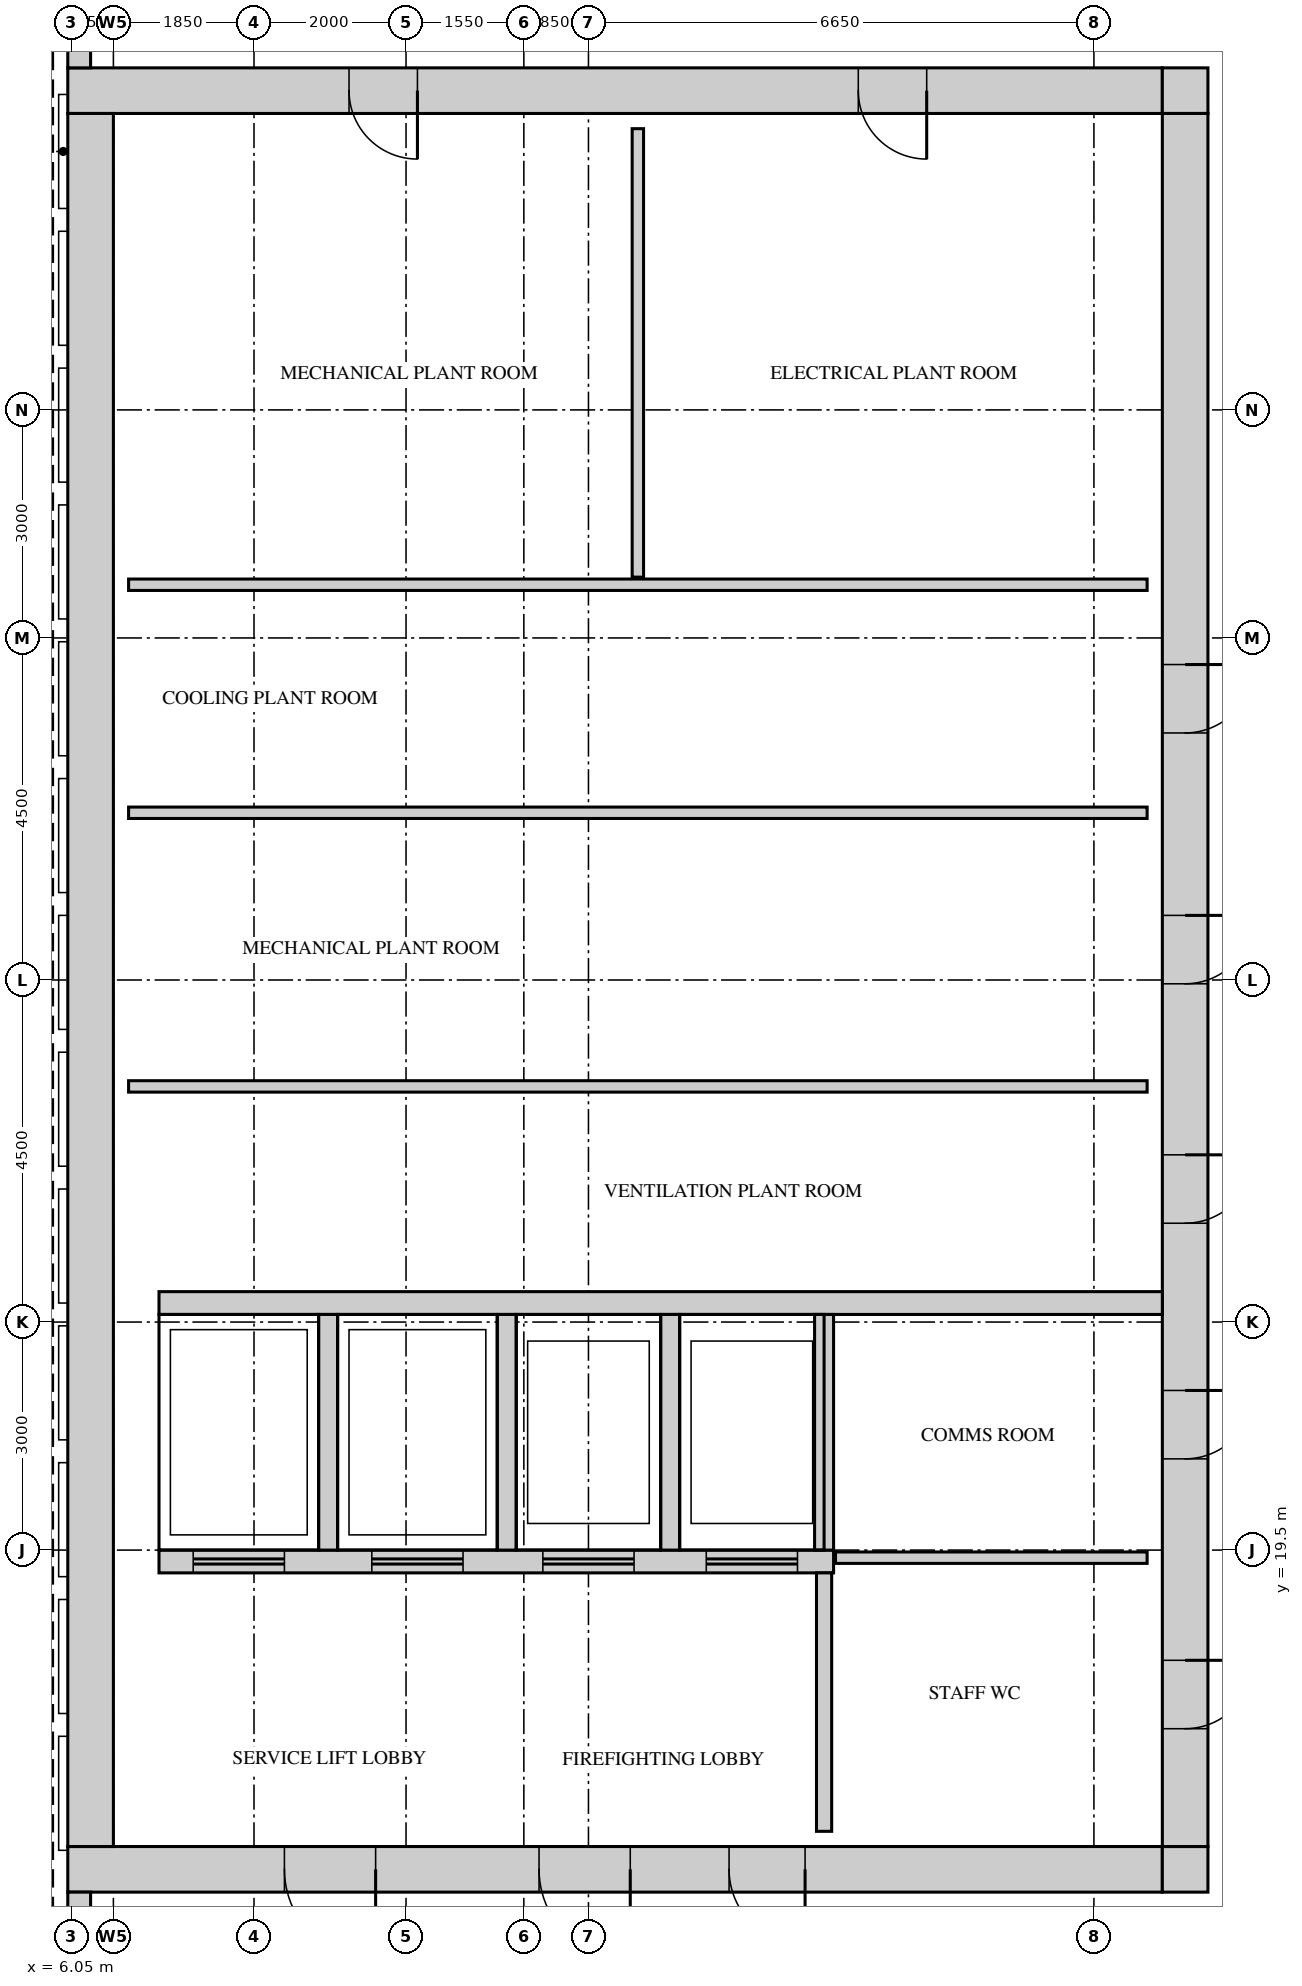
"""IFC4 building model, lengths in metres.
Left out: names, types, materials, properties, quantities, classifications, styles, units other than length and angle.
Written with IfcOpenShell. Run it as: python <this file> out.ifc"""

import sys

from ifc_helpers import new_model, si_unit, direction, frame, frame_2d, origin, place, context, subcontext, project, spatial, rectangle, extrude, source, transform, mapped, element, fill, save


model = new_model("IFC4")
c1 = context("Model", 3, precision=1e-05, world=origin(), true_north=direction((0.0, 1.0)))
c2 = subcontext(c1, "Body", "Model", "MODEL_VIEW")
j1 = project(units=[si_unit("LENGTHUNIT", "METRE"), si_unit("PLANEANGLEUNIT", "RADIAN")], contexts=[c1])
p1 = place(None, origin())
s1 = spatial("IfcSite", under=j1, at=p1, CompositionType="ELEMENT")
p2 = place(p1, origin())
s2 = spatial("IfcBuilding", under=s1, at=p2, CompositionType="ELEMENT")
p3 = place(p2, frame((0.0, 0.0, 343.7)))
s3 = spatial("IfcBuildingStorey", under=s2, at=p3, CompositionType="ELEMENT", Elevation=343.7)
m1 = source(origin(), c2, "Body", "SweptSolid", [
    extrude(rectangle(XDim=14.4, YDim=0.6, at=frame_2d((7.2, 0.0))), origin(), (0.0, 0.0, 1.0), 4.25),
])
p4 = place(p3, frame((6.0, 38.7, 0.0), z_axis=(0.0, 0.0, 1.0), x_axis=(1.0, 0.0, 0.0)))
e1 = element("IfcWall", 1, at=p4, inside=s3, PredefinedType="SHEAR", context=c2, shape_type="MappedRepresentation", body=[
    mapped(m1, transform((0.0, 0.0, 0.0))),
])
m2 = source(origin(), c2, "Body", "SweptSolid", [
    extrude(rectangle(XDim=0.9, YDim=2.1, at=frame_2d((0.45, 1.05))), frame((0.0, 0.31, 0.0), z_axis=(0.0, -1.0, 0.0), x_axis=(1.0, 0.0, 0.0)), (0.0, 0.0, 1.0), 0.62),
])
p5 = place(p4, frame((3.7, 0.0, 0.0)))
e2 = element("IfcOpeningElement", 2, at=p5, cuts=e1, PredefinedType="OPENING", context=c2, shape_type="MappedRepresentation", body=[
    mapped(m2, transform((0.0, 0.0, 0.0))),
])
p6 = place(p4, frame((10.4, 0.0, 0.0)))
e3 = element("IfcOpeningElement", 3, at=p6, cuts=e1, PredefinedType="OPENING", context=c2, shape_type="MappedRepresentation", body=[
    mapped(m2, transform((0.0, 0.0, 0.0))),
])
m3 = source(origin(), c2, "Body", "SweptSolid", [
    extrude(rectangle(XDim=0.6, YDim=0.6, at=frame_2d((0.3, 0.0))), origin(), (0.0, 0.0, 1.0), 4.25),
])
p7 = place(p3, frame((20.4, 38.7, 0.0), z_axis=(0.0, 0.0, 1.0), x_axis=(1.0, 0.0, 0.0)))
e4 = element("IfcWall", 4, at=p7, inside=s3, PredefinedType="SHEAR", context=c2, shape_type="MappedRepresentation", body=[
    mapped(m3, transform((0.0, 0.0, 0.0))),
])
p8 = place(p3, frame((6.0, 15.3, 0.0), z_axis=(0.0, 0.0, 1.0), x_axis=(1.0, 0.0, 0.0)))
e5 = element("IfcWall", 5, at=p8, inside=s3, PredefinedType="SHEAR", context=c2, shape_type="MappedRepresentation", body=[
    mapped(m1, transform((0.0, 0.0, 0.0))),
])
m4 = source(origin(), c2, "Body", "SweptSolid", [
    extrude(rectangle(XDim=1.2, YDim=2.1, at=frame_2d((0.6, 1.05))), frame((0.0, 0.31, 0.0), z_axis=(0.0, -1.0, 0.0), x_axis=(1.0, 0.0, 0.0)), (0.0, 0.0, 1.0), 0.62),
])
p9 = place(p8, frame((6.2, 0.0, 0.0)))
e6 = element("IfcOpeningElement", 6, at=p9, cuts=e5, PredefinedType="OPENING", context=c2, shape_type="MappedRepresentation", body=[
    mapped(m4, transform((0.0, 0.0, 0.0))),
])
p10 = place(p8, frame((2.85, 0.0, 0.0)))
e7 = element("IfcOpeningElement", 7, at=p10, cuts=e5, PredefinedType="OPENING", context=c2, shape_type="MappedRepresentation", body=[
    mapped(m4, transform((0.0, 0.0, 0.0))),
])
m5 = source(origin(), c2, "Body", "SweptSolid", [
    extrude(rectangle(XDim=1.0, YDim=2.1, at=frame_2d((0.5, 1.05))), frame((0.0, 0.31, 0.0), z_axis=(0.0, -1.0, 0.0), x_axis=(1.0, 0.0, 0.0)), (0.0, 0.0, 1.0), 0.62),
])
p11 = place(p8, frame((8.7, 0.0, 0.0)))
e8 = element("IfcOpeningElement", 8, at=p11, cuts=e5, PredefinedType="OPENING", context=c2, shape_type="MappedRepresentation", body=[
    mapped(m5, transform((0.0, 0.0, 0.0))),
])
p12 = place(p3, frame((20.4, 15.3, 0.0), z_axis=(0.0, 0.0, 1.0), x_axis=(1.0, 0.0, 0.0)))
e9 = element("IfcWall", 9, at=p12, inside=s3, PredefinedType="SHEAR", context=c2, shape_type="MappedRepresentation", body=[
    mapped(m3, transform((0.0, 0.0, 0.0))),
])
m6 = source(origin(), c2, "Body", "SweptSolid", [
    extrude(rectangle(XDim=22.8, YDim=0.6, at=frame_2d((11.4, 0.0))), origin(), (0.0, 0.0, 1.0), 4.25),
])
p13 = place(p3, frame((20.7, 15.6, 0.0), z_axis=(0.0, 0.0, 1.0), x_axis=(0.0, 1.0, 0.0)))
e10 = element("IfcWall", 10, at=p13, inside=s3, PredefinedType="SHEAR", context=c2, shape_type="MappedRepresentation", body=[
    mapped(m6, transform((0.0, 0.0, 0.0))),
])
p14 = place(p13, frame((8.2, 0.0, 0.0)))
e11 = element("IfcOpeningElement", 11, at=p14, cuts=e10, PredefinedType="OPENING", context=c2, shape_type="MappedRepresentation", body=[
    mapped(m2, transform((0.0, 0.0, 0.0))),
])
p15 = place(p13, frame((11.35, 0.0, 0.0)))
e12 = element("IfcOpeningElement", 12, at=p15, cuts=e10, PredefinedType="OPENING", context=c2, shape_type="MappedRepresentation", body=[
    mapped(m2, transform((0.0, 0.0, 0.0))),
])
p16 = place(p13, frame((14.65, 0.0, 0.0)))
e13 = element("IfcOpeningElement", 13, at=p16, cuts=e10, PredefinedType="OPENING", context=c2, shape_type="MappedRepresentation", body=[
    mapped(m2, transform((0.0, 0.0, 0.0))),
])
p17 = place(p13, frame((1.55, 0.0, 0.0)))
e14 = element("IfcOpeningElement", 14, at=p17, cuts=e10, PredefinedType="OPENING", context=c2, shape_type="MappedRepresentation", body=[
    mapped(m2, transform((0.0, 0.0, 0.0))),
])
p18 = place(p13, frame((5.1, 0.0, 0.0)))
e15 = element("IfcOpeningElement", 15, at=p18, cuts=e10, PredefinedType="OPENING", context=c2, shape_type="MappedRepresentation", body=[
    mapped(m2, transform((0.0, 0.0, 0.0))),
])
p19 = place(p3, frame((6.3, 15.6, 0.0), z_axis=(0.0, 0.0, 1.0), x_axis=(0.0, 1.0, 0.0)))
e16 = element("IfcWall", 16, at=p19, inside=s3, PredefinedType="SHEAR", context=c2, shape_type="MappedRepresentation", body=[
    mapped(m6, transform((0.0, 0.0, 0.0))),
])
m7 = source(origin(), c2, "Body", "SweptSolid", [
    extrude(rectangle(XDim=13.2, YDim=0.3, at=frame_2d((6.6, 0.0))), origin(), (0.0, 0.0, 1.0), 4.25),
])
p20 = place(p3, frame((7.2, 22.75, 0.0), z_axis=(0.0, 0.0, 1.0), x_axis=(1.0, 0.0, 0.0)))
e17 = element("IfcWall", 17, at=p20, inside=s3, PredefinedType="STANDARD", context=c2, shape_type="MappedRepresentation", body=[
    mapped(m7, transform((0.0, 0.0, 0.0))),
])
m8 = source(origin(), c2, "Body", "SweptSolid", [
    extrude(rectangle(XDim=8.875, YDim=0.3, at=frame_2d((4.438, 0.0))), origin(), (0.0, 0.0, 1.0), 4.25),
])
p21 = place(p3, frame((7.2, 19.35, 0.0), z_axis=(0.0, 0.0, 1.0), x_axis=(1.0, 0.0, 0.0)))
e18 = element("IfcWall", 18, at=p21, inside=s3, PredefinedType="STANDARD", context=c2, shape_type="MappedRepresentation", body=[
    mapped(m8, transform((0.0, 0.0, 0.0))),
])
m9 = source(origin(), c2, "Body", "SweptSolid", [
    extrude(rectangle(XDim=1.2, YDim=2.1, at=frame_2d((0.6, 1.05))), frame((0.0, 0.16, 0.0), z_axis=(0.0, -1.0, 0.0), x_axis=(1.0, 0.0, 0.0)), (0.0, 0.0, 1.0), 0.32),
])
p22 = place(p21, frame((0.45, 0.0, 0.0)))
e19 = element("IfcOpeningElement", 19, at=p22, cuts=e18, PredefinedType="OPENING", context=c2, shape_type="MappedRepresentation", body=[
    mapped(m9, transform((0.0, 0.0, 0.0))),
])
p23 = place(p21, frame((2.8, 0.0, 0.0)))
e20 = element("IfcOpeningElement", 20, at=p23, cuts=e18, PredefinedType="OPENING", context=c2, shape_type="MappedRepresentation", body=[
    mapped(m9, transform((0.0, 0.0, 0.0))),
])
p24 = place(p21, frame((5.05, 0.0, 0.0)))
e21 = element("IfcOpeningElement", 21, at=p24, cuts=e18, PredefinedType="OPENING", context=c2, shape_type="MappedRepresentation", body=[
    mapped(m9, transform((0.0, 0.0, 0.0))),
])
p25 = place(p21, frame((7.2, 0.0, 0.0)))
e22 = element("IfcOpeningElement", 22, at=p25, cuts=e18, PredefinedType="OPENING", context=c2, shape_type="MappedRepresentation", body=[
    mapped(m9, transform((0.0, 0.0, 0.0))),
])
m10 = source(origin(), c2, "Body", "SweptSolid", [
    extrude(rectangle(XDim=3.1, YDim=0.25, at=frame_2d((1.55, 0.0))), origin(), (0.0, 0.0, 1.0), 4.25),
])
for number, where, z_axis, x_axis in (
    (23, (9.425, 19.5, 0.0), (0.0, 0.0, 1.0), (0.0, 1.0, 0.0)),
    (24, (11.775, 19.5, 0.0), (0.0, 0.0, 1.0), (0.0, 1.0, 0.0)),
    (25, (13.925, 19.5, 0.0), (0.0, 0.0, 1.0), (0.0, 1.0, 0.0)),
    (26, (15.95, 19.5, 0.0), (0.0, 0.0, 1.0), (0.0, 1.0, 0.0)),
):
    element("IfcWall", number, at=place(p3, frame(where, z_axis=z_axis, x_axis=x_axis)), inside=s3, PredefinedType="STANDARD", context=c2, shape_type="MappedRepresentation", body=[
        mapped(m10, transform((0.0, 0.0, 0.0))),
    ])
m11 = source(origin(), c2, "Body", "SweptSolid", [
    extrude(rectangle(XDim=2.7, YDim=0.3, at=frame_2d((1.35, 0.0))), origin(), (0.0, 0.0, 1.0), 4.5),
])
p26 = place(p3, frame((6.15, 41.7, 0.0), z_axis=(0.0, 0.0, 1.0), x_axis=(0.0, -1.0, 0.0)))
e27 = element("IfcWall", 27, at=p26, inside=s3, PredefinedType="SOLIDWALL", context=c2, shape_type="MappedRepresentation", body=[
    mapped(m11, transform((0.0, 0.0, 0.0))),
])
m12 = source(origin(), c2, "Body", "SweptSolid", [
    extrude(rectangle(XDim=1.2, YDim=2.4, at=frame_2d((0.6, 1.2))), frame((0.0, 0.16, 0.0), z_axis=(0.0, -1.0, 0.0), x_axis=(1.0, 0.0, 0.0)), (0.0, 0.0, 1.0), 0.32),
])
p27 = place(p26, frame((0.75, 0.0, 0.9)))
e28 = element("IfcOpeningElement", 28, at=p27, cuts=e27, PredefinedType="OPENING", context=c2, shape_type="MappedRepresentation", body=[
    mapped(m12, transform((0.0, 0.0, 0.0))),
])
m13 = source(origin(), c2, "Body", "SweptSolid", [
    extrude(rectangle(XDim=3.0, YDim=0.3, at=frame_2d((1.5, 0.0))), origin(), (0.0, 0.0, 1.0), 4.5),
])
p28 = place(p3, frame((6.15, 15.0, 0.0), z_axis=(0.0, 0.0, 1.0), x_axis=(0.0, -1.0, 0.0)))
e29 = element("IfcWall", 29, at=p28, inside=s3, PredefinedType="SOLIDWALL", context=c2, shape_type="MappedRepresentation", body=[
    mapped(m13, transform((0.0, 0.0, 0.0))),
])
p29 = place(p28, frame((0.9, 0.0, 0.9)))
e30 = element("IfcOpeningElement", 30, at=p29, cuts=e29, PredefinedType="OPENING", context=c2, shape_type="MappedRepresentation", body=[
    mapped(m12, transform((0.0, 0.0, 0.0))),
])
m14 = source(origin(), c2, "Body", "SweptSolid", [
    extrude(rectangle(XDim=3.4, YDim=0.2, at=frame_2d((1.7, 0.0))), origin(), (0.0, 0.0, 1.0), 4.3),
])
p30 = place(p3, frame((15.95, 15.8, 0.0), z_axis=(0.0, 0.0, 1.0), x_axis=(0.0, 1.0, 0.0)))
e31 = element("IfcWall", 31, at=p30, inside=s3, PredefinedType="PARTITIONING", context=c2, shape_type="MappedRepresentation", body=[
    mapped(m14, transform((0.0, 0.0, 0.0))),
])
m15 = source(origin(), c2, "Body", "SweptSolid", [
    extrude(rectangle(XDim=4.1, YDim=0.15, at=frame_2d((2.05, 0.0))), origin(), (0.0, 0.0, 1.0), 4.3),
])
p31 = place(p3, frame((16.1, 19.4, 0.0), z_axis=(0.0, 0.0, 1.0), x_axis=(1.0, 0.0, 0.0)))
e32 = element("IfcWall", 32, at=p31, inside=s3, PredefinedType="PARTITIONING", context=c2, shape_type="MappedRepresentation", body=[
    mapped(m15, transform((0.0, 0.0, 0.0))),
])
m16 = source(origin(), c2, "Body", "SweptSolid", [
    extrude(rectangle(XDim=13.4, YDim=0.15, at=frame_2d((6.7, 0.0))), origin(), (0.0, 0.0, 1.0), 4.3),
])
for number, where, z_axis, x_axis in (
    (33, (6.8, 25.6, 0.0), (0.0, 0.0, 1.0), (1.0, 0.0, 0.0)),
    (34, (6.8, 29.2, 0.0), (0.0, 0.0, 1.0), (1.0, 0.0, 0.0)),
    (35, (6.8, 32.2, 0.0), (0.0, 0.0, 1.0), (1.0, 0.0, 0.0)),
):
    element("IfcWall", number, at=place(p3, frame(where, z_axis=z_axis, x_axis=x_axis)), inside=s3, PredefinedType="PARTITIONING", context=c2, shape_type="MappedRepresentation", body=[
        mapped(m16, transform((0.0, 0.0, 0.0))),
    ])
m17 = source(origin(), c2, "Body", "SweptSolid", [
    extrude(rectangle(XDim=5.9, YDim=0.15, at=frame_2d((2.95, 0.0))), origin(), (0.0, 0.0, 1.0), 4.3),
])
p32 = place(p3, frame((13.5, 32.3, 0.0), z_axis=(0.0, 0.0, 1.0), x_axis=(0.0, 1.0, 0.0)))
e36 = element("IfcWall", 36, at=p32, inside=s3, PredefinedType="PARTITIONING", context=c2, shape_type="MappedRepresentation", body=[
    mapped(m17, transform((0.0, 0.0, 0.0))),
])
m18 = source(origin(), c2, "Body", "SweptSolid", [
    extrude(rectangle(XDim=0.9, YDim=2.1, at=frame_2d((0.45, 1.05))), frame((0.0, 0.25, 0.0), z_axis=(0.0, -1.0, 0.0), x_axis=(1.0, 0.0, 0.0)), (0.0, 0.0, 1.0), 0.5),
])
p33 = place(p14, origin())
e37 = element("IfcDoor", 37, at=p33, inside=s3, OperationType="SINGLE_SWING_RIGHT", PredefinedType="DOOR", context=c2, shape_type="MappedRepresentation", body=[
    mapped(m18, transform((0.0, 0.0, 0.0))),
])
fill(e11, e37)
p34 = place(p15, origin())
e38 = element("IfcDoor", 38, at=p34, inside=s3, OperationType="SINGLE_SWING_RIGHT", PredefinedType="DOOR", context=c2, shape_type="MappedRepresentation", body=[
    mapped(m18, transform((0.0, 0.0, 0.0))),
])
fill(e12, e38)
p35 = place(p16, origin())
e39 = element("IfcDoor", 39, at=p35, inside=s3, OperationType="SINGLE_SWING_RIGHT", PredefinedType="DOOR", context=c2, shape_type="MappedRepresentation", body=[
    mapped(m18, transform((0.0, 0.0, 0.0))),
])
fill(e13, e39)
p36 = place(p5, origin())
e40 = element("IfcDoor", 40, at=p36, inside=s3, OperationType="SINGLE_SWING_RIGHT", PredefinedType="DOOR", context=c2, shape_type="MappedRepresentation", body=[
    mapped(m18, transform((0.0, 0.0, 0.0))),
])
fill(e2, e40)
p37 = place(p6, origin())
e41 = element("IfcDoor", 41, at=p37, inside=s3, OperationType="SINGLE_SWING_RIGHT", PredefinedType="DOOR", context=c2, shape_type="MappedRepresentation", body=[
    mapped(m18, transform((0.0, 0.0, 0.0))),
])
fill(e3, e41)
p38 = place(p17, origin())
e42 = element("IfcDoor", 42, at=p38, inside=s3, OperationType="SINGLE_SWING_RIGHT", PredefinedType="DOOR", context=c2, shape_type="MappedRepresentation", body=[
    mapped(m18, transform((0.0, 0.0, 0.0))),
])
fill(e14, e42)
p39 = place(p18, origin())
e43 = element("IfcDoor", 43, at=p39, inside=s3, OperationType="SINGLE_SWING_RIGHT", PredefinedType="DOOR", context=c2, shape_type="MappedRepresentation", body=[
    mapped(m18, transform((0.0, 0.0, 0.0))),
])
fill(e15, e43)
m19 = source(origin(), c2, "Body", "SweptSolid", [
    extrude(rectangle(XDim=1.2, YDim=2.1, at=frame_2d((0.6, 1.05))), frame((0.0, 0.25, 0.0), z_axis=(0.0, -1.0, 0.0), x_axis=(1.0, 0.0, 0.0)), (0.0, 0.0, 1.0), 0.5),
])
p40 = place(p9, origin())
e44 = element("IfcDoor", 44, at=p40, inside=s3, OperationType="SINGLE_SWING_RIGHT", PredefinedType="DOOR", context=c2, shape_type="MappedRepresentation", body=[
    mapped(m19, transform((0.0, 0.0, 0.0))),
])
fill(e6, e44)
p41 = place(p10, origin())
e45 = element("IfcDoor", 45, at=p41, inside=s3, OperationType="SINGLE_SWING_RIGHT", PredefinedType="DOOR", context=c2, shape_type="MappedRepresentation", body=[
    mapped(m19, transform((0.0, 0.0, 0.0))),
])
fill(e7, e45)
m20 = source(origin(), c2, "Body", "SweptSolid", [
    extrude(rectangle(XDim=1.0, YDim=2.1, at=frame_2d((0.5, 1.05))), frame((0.0, 0.25, 0.0), z_axis=(0.0, -1.0, 0.0), x_axis=(1.0, 0.0, 0.0)), (0.0, 0.0, 1.0), 0.5),
])
p42 = place(p11, origin())
e46 = element("IfcDoor", 46, at=p42, inside=s3, OperationType="SINGLE_SWING_RIGHT", PredefinedType="DOOR", context=c2, shape_type="MappedRepresentation", body=[
    mapped(m20, transform((0.0, 0.0, 0.0))),
])
fill(e8, e46)
m21 = source(origin(), c2, "Body", "SweptSolid", [
    extrude(rectangle(XDim=1.2, YDim=2.1, at=frame_2d((0.6, 1.05))), frame((0.0, 0.025, 0.0), z_axis=(0.0, -1.0, 0.0), x_axis=(1.0, 0.0, 0.0)), (0.0, 0.0, 1.0), 0.05),
])
p43 = place(p22, origin())
e47 = element("IfcDoor", 47, at=p43, inside=s3, OperationType="DOUBLE_DOOR_SLIDING", PredefinedType="DOOR", context=c2, shape_type="MappedRepresentation", body=[
    mapped(m21, transform((0.0, 0.0, 0.0))),
])
fill(e19, e47)
p44 = place(p23, origin())
e48 = element("IfcDoor", 48, at=p44, inside=s3, OperationType="DOUBLE_DOOR_SLIDING", PredefinedType="DOOR", context=c2, shape_type="MappedRepresentation", body=[
    mapped(m21, transform((0.0, 0.0, 0.0))),
])
fill(e20, e48)
p45 = place(p24, origin())
e49 = element("IfcDoor", 49, at=p45, inside=s3, OperationType="DOUBLE_DOOR_SLIDING", PredefinedType="DOOR", context=c2, shape_type="MappedRepresentation", body=[
    mapped(m21, transform((0.0, 0.0, 0.0))),
])
fill(e21, e49)
p46 = place(p25, origin())
e50 = element("IfcDoor", 50, at=p46, inside=s3, OperationType="DOUBLE_DOOR_SLIDING", PredefinedType="DOOR", context=c2, shape_type="MappedRepresentation", body=[
    mapped(m21, transform((0.0, 0.0, 0.0))),
])
fill(e22, e50)
save(model, sys.argv[1])
